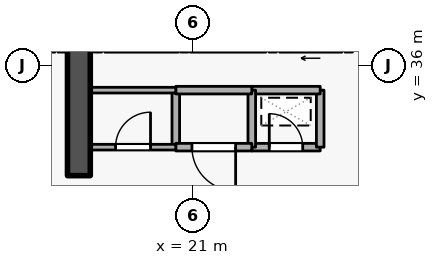
"""IFC4 building model, lengths in metres.
Left out: names, types, materials, properties, quantities, classifications, styles, units other than length and angle.
Written with IfcOpenShell. Run it as: python <this file> out.ifc"""

import sys

from ifc_helpers import new_model, si_unit, direction, frame, frame_2d, origin, place, context, subcontext, project, spatial, rectangle, extrude, element, fill, save


model = new_model("IFC4")
c1 = context("Model", 3, precision=1e-05, world=origin(), true_north=direction((0.0, 1.0)))
c2 = subcontext(c1, "Body", "Model", "MODEL_VIEW")
j1 = project(units=[si_unit("LENGTHUNIT", "METRE"), si_unit("PLANEANGLEUNIT", "RADIAN")], contexts=[c1])
p1 = place(None, origin())
s1 = spatial("IfcSite", under=j1, at=p1, CompositionType="ELEMENT")
p2 = place(p1, origin())
s2 = spatial("IfcBuilding", under=s1, at=p2, CompositionType="ELEMENT")
p3 = place(p2, frame((0.0, 0.0, 23.1)))
s3 = spatial("IfcBuildingStorey", under=s2, at=p3, CompositionType="ELEMENT", Elevation=23.1)
p4 = place(p3, frame((18.0, 33.1, 0.0), z_axis=(0.0, 0.0, 1.0), x_axis=(0.0, 1.0, 0.0)))
e1 = element("IfcWall", 1, at=p4, inside=s3, PredefinedType="SHEAR", context=c2, shape_type="SweptSolid", body=[
    extrude(rectangle(XDim=5.7, YDim=0.6, at=frame_2d((2.85, 0.0))), origin(), (0.0, 0.0, 1.0), 4.8),
])
p5 = place(p3, frame((24.92, 36.45, 0.0), z_axis=(0.0, 0.0, 1.0), x_axis=(-1.0, 0.0, 0.0)))
e2 = element("IfcWall", 2, at=p5, inside=s3, PredefinedType="STANDARD", context=c2, shape_type="SweptSolid", body=[
    extrude(rectangle(XDim=1.64, YDim=0.2, at=frame_2d((0.82, 0.0))), origin(), (0.0, 0.0, 1.0), 4.54),
])
p6 = place(p5, frame((0.31, 0.0, 0.0)))
e3 = element("IfcOpeningElement", 3, at=p6, cuts=e2, PredefinedType="OPENING", context=c2, shape_type="SweptSolid", body=[
    extrude(rectangle(XDim=1.02, YDim=2.06, at=frame_2d((0.51, 1.03))), frame((0.0, 0.11, 0.0), z_axis=(0.0, -1.0, 0.0), x_axis=(1.0, 0.0, 0.0)), (0.0, 0.0, 1.0), 0.22),
])
p7 = place(p3, frame((22.92, 36.45, 0.0), z_axis=(0.0, 0.0, 1.0), x_axis=(-1.0, 0.0, 0.0)))
e4 = element("IfcWall", 4, at=p7, inside=s3, PredefinedType="STANDARD", context=c2, shape_type="SweptSolid", body=[
    extrude(rectangle(XDim=1.99, YDim=0.2, at=frame_2d((0.995, 0.0))), origin(), (0.0, 0.0, 1.0), 4.54),
])
p8 = place(p3, frame((20.62, 36.45, 0.0), z_axis=(0.0, 0.0, 1.0), x_axis=(-1.0, 0.0, 0.0)))
e5 = element("IfcWall", 5, at=p8, inside=s3, PredefinedType="STANDARD", context=c2, shape_type="SweptSolid", body=[
    extrude(rectangle(XDim=1.94, YDim=0.2, at=frame_2d((0.97, 0.0))), origin(), (0.0, 0.0, 1.0), 4.54),
])
p9 = place(p3, frame((17.37, 36.45, 0.0), z_axis=(0.0, 0.0, 1.0), x_axis=(-1.0, 0.0, 0.0)))
e6 = element("IfcWall", 6, at=p9, inside=s3, PredefinedType="STANDARD", context=c2, shape_type="SweptSolid", body=[
    extrude(rectangle(XDim=1.74, YDim=0.2, at=frame_2d((0.87, 0.0))), origin(), (0.0, 0.0, 1.0), 4.54),
])
p10 = place(p3, frame((22.55, 33.85, 0.0), z_axis=(0.0, 0.0, 1.0), x_axis=(1.0, 0.0, 0.0)))
e7 = element("IfcWall", 7, at=p10, inside=s3, PredefinedType="STANDARD", context=c2, shape_type="SweptSolid", body=[
    extrude(rectangle(XDim=1.8, YDim=0.2, at=frame_2d((0.9, 0.0))), origin(), (0.0, 0.0, 1.0), 4.54),
])
p11 = place(p10, frame((0.46, 0.0, 0.0)))
e8 = element("IfcOpeningElement", 8, at=p11, cuts=e7, PredefinedType="OPENING", context=c2, shape_type="SweptSolid", body=[
    extrude(rectangle(XDim=0.88, YDim=2.04, at=frame_2d((0.44, 1.02))), frame((0.0, 0.11, 0.0), z_axis=(0.0, -1.0, 0.0), x_axis=(1.0, 0.0, 0.0)), (0.0, 0.0, 1.0), 0.22),
])
p12 = place(p3, frame((24.35, 33.85, 0.0), z_axis=(0.0, 0.0, 1.0), x_axis=(0.0, 1.0, 0.0)))
e9 = element("IfcWall", 9, at=p12, inside=s3, PredefinedType="STANDARD", context=c2, shape_type="SweptSolid", body=[
    extrude(rectangle(XDim=1.5, YDim=0.2, at=frame_2d((0.75, 0.0))), origin(), (0.0, 0.0, 1.0), 4.54),
])
p13 = place(p3, frame((24.35, 35.35, 0.0), z_axis=(0.0, 0.0, 1.0), x_axis=(-1.0, 0.0, 0.0)))
e10 = element("IfcWall", 10, at=p13, inside=s3, PredefinedType="STANDARD", context=c2, shape_type="SweptSolid", body=[
    extrude(rectangle(XDim=1.8, YDim=0.2, at=frame_2d((0.9, 0.0))), origin(), (0.0, 0.0, 1.0), 4.54),
])
for number, where, z_axis, x_axis in (
    (11, (22.55, 35.35, 0.0), (0.0, 0.0, 1.0), (0.0, -1.0, 0.0)),
    (12, (20.55, 33.85, 0.0), (0.0, 0.0, 1.0), (0.0, 1.0, 0.0)),
):
    element("IfcWall", number, at=place(p3, frame(where, z_axis=z_axis, x_axis=x_axis)), inside=s3, PredefinedType="STANDARD", context=c2, shape_type="SweptSolid", body=[
        extrude(rectangle(XDim=1.5, YDim=0.2, at=frame_2d((0.75, 0.0))), origin(), (0.0, 0.0, 1.0), 4.54),
    ])
p14 = place(p3, frame((20.55, 35.35, 0.0), z_axis=(0.0, 0.0, 1.0), x_axis=(1.0, 0.0, 0.0)))
e13 = element("IfcWall", 13, at=p14, inside=s3, PredefinedType="STANDARD", context=c2, shape_type="SweptSolid", body=[
    extrude(rectangle(XDim=2.0, YDim=0.2, at=frame_2d((1.0, 0.0))), origin(), (0.0, 0.0, 1.0), 4.54),
])
p15 = place(p3, frame((22.55, 33.85, 0.0), z_axis=(0.0, 0.0, 1.0), x_axis=(-1.0, 0.0, 0.0)))
e14 = element("IfcWall", 14, at=p15, inside=s3, PredefinedType="STANDARD", context=c2, shape_type="SweptSolid", body=[
    extrude(rectangle(XDim=2.0, YDim=0.2, at=frame_2d((1.0, 0.0))), origin(), (0.0, 0.0, 1.0), 4.54),
])
p16 = place(p15, frame((0.425, 0.0, 0.0)))
e15 = element("IfcOpeningElement", 15, at=p16, cuts=e14, PredefinedType="OPENING", context=c2, shape_type="SweptSolid", body=[
    extrude(rectangle(XDim=1.15, YDim=2.1, at=frame_2d((0.575, 1.05))), frame((0.0, 0.11, 0.0), z_axis=(0.0, -1.0, 0.0), x_axis=(1.0, 0.0, 0.0)), (0.0, 0.0, 1.0), 0.22),
])
p17 = place(p3, frame((18.3, 33.85, 0.0), z_axis=(0.0, 0.0, 1.0), x_axis=(1.0, 0.0, 0.0)))
e16 = element("IfcWall", 16, at=p17, inside=s3, PredefinedType="PARTITIONING", context=c2, shape_type="SweptSolid", body=[
    extrude(rectangle(XDim=2.25, YDim=0.15, at=frame_2d((1.125, 0.0))), origin(), (0.0, 0.0, 1.0), 4.54),
])
p18 = place(p17, frame((0.665, 0.0, 0.0)))
e17 = element("IfcOpeningElement", 17, at=p18, cuts=e16, PredefinedType="OPENING", context=c2, shape_type="SweptSolid", body=[
    extrude(rectangle(XDim=0.92, YDim=2.08, at=frame_2d((0.46, 1.04))), frame((0.0, 0.085, 0.0), z_axis=(0.0, -1.0, 0.0), x_axis=(1.0, 0.0, 0.0)), (0.0, 0.0, 1.0), 0.17),
])
p19 = place(p3, frame((20.55, 35.35, 0.0), z_axis=(0.0, 0.0, 1.0), x_axis=(-1.0, 0.0, 0.0)))
e18 = element("IfcWall", 18, at=p19, inside=s3, PredefinedType="PARTITIONING", context=c2, shape_type="SweptSolid", body=[
    extrude(rectangle(XDim=2.25, YDim=0.15, at=frame_2d((1.125, 0.0))), origin(), (0.0, 0.0, 1.0), 4.54),
])
p20 = place(p11, origin())
e19 = element("IfcDoor", 19, at=p20, inside=s3, OperationType="SINGLE_SWING_LEFT", PredefinedType="DOOR", context=c2, shape_type="SweptSolid", body=[
    extrude(rectangle(XDim=0.88, YDim=2.04, at=frame_2d((0.44, 1.02))), frame((0.0, 0.025, 0.0), z_axis=(0.0, -1.0, 0.0), x_axis=(1.0, 0.0, 0.0)), (0.0, 0.0, 1.0), 0.05),
])
fill(e8, e19)
p21 = place(p18, origin())
e20 = element("IfcDoor", 20, at=p21, inside=s3, OperationType="SINGLE_SWING_RIGHT", PredefinedType="DOOR", context=c2, shape_type="SweptSolid", body=[
    extrude(rectangle(XDim=0.92, YDim=2.08, at=frame_2d((0.46, 1.04))), frame((0.0, 0.025, 0.0), z_axis=(0.0, -1.0, 0.0), x_axis=(1.0, 0.0, 0.0)), (0.0, 0.0, 1.0), 0.05),
])
fill(e17, e20)
p22 = place(p16, origin())
e21 = element("IfcDoor", 21, at=p22, inside=s3, OperationType="SINGLE_SWING_LEFT", PredefinedType="DOOR", context=c2, shape_type="SweptSolid", body=[
    extrude(rectangle(XDim=1.15, YDim=2.1, at=frame_2d((0.575, 1.05))), frame((0.0, 0.025, 0.0), z_axis=(0.0, -1.0, 0.0), x_axis=(1.0, 0.0, 0.0)), (0.0, 0.0, 1.0), 0.05),
])
fill(e15, e21)
save(model, sys.argv[1])
